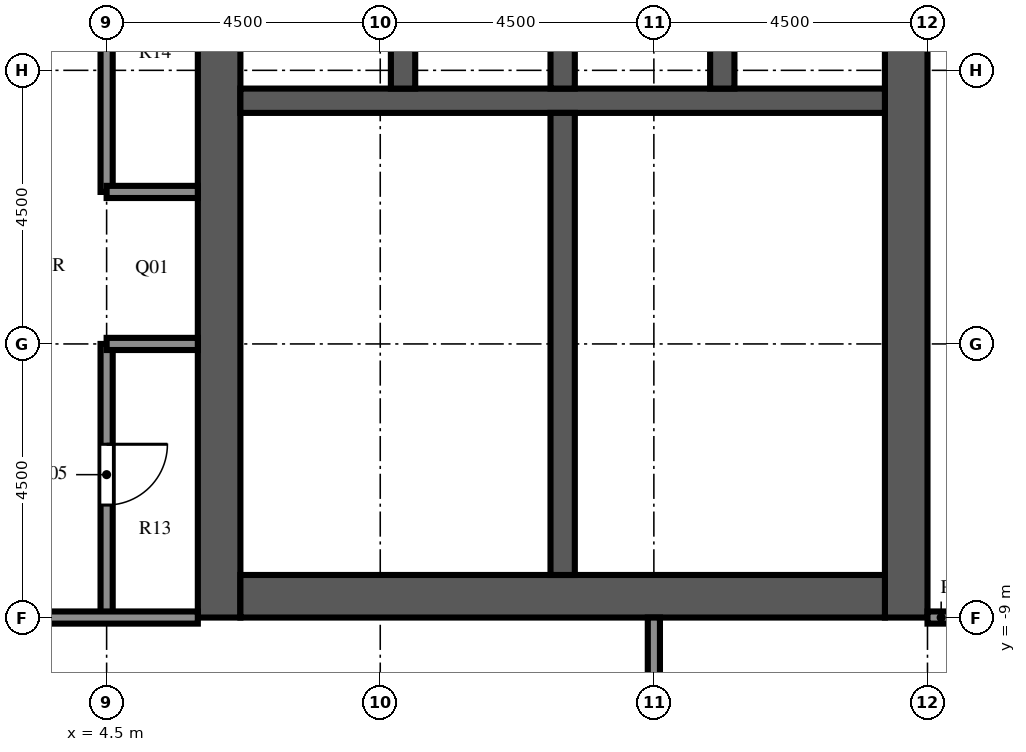
"""IFC4 building model, lengths in metres.
Left out: names, types, materials, properties, quantities, classifications, styles, units other than length and angle.
Written with IfcOpenShell. Run it as: python <this file> out.ifc"""

import sys

from ifc_helpers import new_model, si_unit, direction, frame, frame_2d, origin, place, context, subcontext, project, spatial, rectangle, extrude, element, fill, save


model = new_model("IFC4")
c1 = context("Model", 3, precision=1e-05, world=origin(), true_north=direction((0.0, 1.0)))
c2 = subcontext(c1, "Body", "Model", "MODEL_VIEW")
j1 = project(units=[si_unit("LENGTHUNIT", "METRE"), si_unit("PLANEANGLEUNIT", "RADIAN")], contexts=[c1])
p1 = place(None, origin())
s1 = spatial("IfcSite", under=j1, at=p1, CompositionType="ELEMENT")
p2 = place(p1, origin())
s2 = spatial("IfcBuilding", under=s1, at=p2, CompositionType="ELEMENT")
p3 = place(p2, frame((0.0, 0.0, 295.0)))
s3 = spatial("IfcBuildingStorey", under=s2, at=p3, CompositionType="ELEMENT", Elevation=295.0)
p4 = place(p3, frame((6.35, -9.0, 0.0), z_axis=(0.0, 0.0, 1.0), x_axis=(0.0, 1.0, 0.0)))
e1 = element("IfcWall", 1, at=p4, inside=s3, PredefinedType="SHEAR", context=c2, shape_type="SweptSolid", body=[
    extrude(rectangle(XDim=27.5, YDim=0.7, at=frame_2d((13.75, 0.0))), origin(), (0.0, 0.0, 1.0), 6.0),
])
p5 = place(p4, frame((12.55, 0.0, 0.0)))
e2 = element("IfcOpeningElement", 2, at=p5, cuts=e1, PredefinedType="OPENING", context=c2, shape_type="SweptSolid", body=[
    extrude(rectangle(XDim=2.4, YDim=2.4, at=frame_2d((1.2, 1.2))), frame((0.0, 0.36, 0.0), z_axis=(0.0, -1.0, 0.0), x_axis=(1.0, 0.0, 0.0)), (0.0, 0.0, 1.0), 0.72),
])
p6 = place(p4, frame((5.46, 0.0, 0.0)))
e3 = element("IfcOpeningElement", 3, at=p6, cuts=e1, PredefinedType="OPENING", context=c2, shape_type="SweptSolid", body=[
    extrude(rectangle(XDim=0.968, YDim=2.1, at=frame_2d((0.484, 1.05))), frame((0.0, 0.36, 0.0), z_axis=(0.0, -1.0, 0.0), x_axis=(1.0, 0.0, 0.0)), (0.0, 0.0, 1.0), 0.72),
])
p7 = place(p4, frame((23.54, 0.0, 0.0)))
e4 = element("IfcOpeningElement", 4, at=p7, cuts=e1, PredefinedType="OPENING", context=c2, shape_type="SweptSolid", body=[
    extrude(rectangle(XDim=1.2, YDim=2.1, at=frame_2d((0.6, 1.05))), frame((0.0, 0.36, 0.0), z_axis=(0.0, -1.0, 0.0), x_axis=(1.0, 0.0, 0.0)), (0.0, 0.0, 1.0), 0.72),
])
p8 = place(p3, frame((17.65, -9.0, 0.0), z_axis=(0.0, 0.0, 1.0), x_axis=(0.0, 1.0, 0.0)))
e5 = element("IfcWall", 5, at=p8, inside=s3, PredefinedType="SHEAR", context=c2, shape_type="SweptSolid", body=[
    extrude(rectangle(XDim=27.5, YDim=0.7, at=frame_2d((13.75, 0.0))), origin(), (0.0, 0.0, 1.0), 6.0),
])
p9 = place(p8, frame((12.55, 0.0, 0.0)))
e6 = element("IfcOpeningElement", 6, at=p9, cuts=e5, PredefinedType="OPENING", context=c2, shape_type="SweptSolid", body=[
    extrude(rectangle(XDim=2.4, YDim=2.4, at=frame_2d((1.2, 1.2))), frame((0.0, 0.36, 0.0), z_axis=(0.0, -1.0, 0.0), x_axis=(1.0, 0.0, 0.0)), (0.0, 0.0, 1.0), 0.72),
])
p10 = place(p8, frame((6.825, 0.0, 0.0)))
e7 = element("IfcOpeningElement", 7, at=p10, cuts=e5, PredefinedType="OPENING", context=c2, shape_type="SweptSolid", body=[
    extrude(rectangle(XDim=1.2, YDim=2.1, at=frame_2d((0.6, 1.05))), frame((0.0, 0.36, 0.0), z_axis=(0.0, -1.0, 0.0), x_axis=(1.0, 0.0, 0.0)), (0.0, 0.0, 1.0), 0.72),
])
p11 = place(p8, frame((19.475, 0.0, 0.0)))
e8 = element("IfcOpeningElement", 8, at=p11, cuts=e5, PredefinedType="OPENING", context=c2, shape_type="SweptSolid", body=[
    extrude(rectangle(XDim=1.2, YDim=2.1, at=frame_2d((0.6, 1.05))), frame((0.0, 0.36, 0.0), z_axis=(0.0, -1.0, 0.0), x_axis=(1.0, 0.0, 0.0)), (0.0, 0.0, 1.0), 0.72),
])
p12 = place(p3, frame((6.7, -8.65, 0.0), z_axis=(0.0, 0.0, 1.0), x_axis=(1.0, 0.0, 0.0)))
e9 = element("IfcWall", 9, at=p12, inside=s3, PredefinedType="SHEAR", context=c2, shape_type="SweptSolid", body=[
    extrude(rectangle(XDim=10.6, YDim=0.7, at=frame_2d((5.3, 0.0))), origin(), (0.0, 0.0, 1.0), 6.0),
])
p13 = place(p3, frame((6.7, -0.5, 0.0), z_axis=(0.0, 0.0, 1.0), x_axis=(1.0, 0.0, 0.0)))
e10 = element("IfcWall", 10, at=p13, inside=s3, PredefinedType="SHEAR", context=c2, shape_type="SweptSolid", body=[
    extrude(rectangle(XDim=10.6, YDim=0.4, at=frame_2d((5.3, 0.0))), origin(), (0.0, 0.0, 1.0), 6.0),
])
for number, where, z_axis, x_axis in (
    (11, (9.375, -0.3, 0.0), (0.0, 0.0, 1.0), (0.0, 1.0, 0.0)),
    (12, (12.0, -0.3, 0.0), (0.0, 0.0, 1.0), (0.0, 1.0, 0.0)),
    (13, (14.625, -0.3, 0.0), (0.0, 0.0, 1.0), (0.0, 1.0, 0.0)),
):
    element("IfcWall", number, at=place(p3, frame(where, z_axis=z_axis, x_axis=x_axis)), inside=s3, PredefinedType="SHEAR", context=c2, shape_type="SweptSolid", body=[
        extrude(rectangle(XDim=2.9, YDim=0.4, at=frame_2d((1.45, 0.0))), origin(), (0.0, 0.0, 1.0), 6.0),
    ])
p14 = place(p3, frame((12.0, -8.3, 0.0), z_axis=(0.0, 0.0, 1.0), x_axis=(0.0, 1.0, 0.0)))
e14 = element("IfcWall", 14, at=p14, inside=s3, PredefinedType="SHEAR", context=c2, shape_type="SweptSolid", body=[
    extrude(rectangle(XDim=7.6, YDim=0.4, at=frame_2d((3.8, 0.0))), origin(), (0.0, 0.0, 1.0), 6.0),
])
p15 = place(p3, frame((6.7, -3.74, 0.0), z_axis=(0.0, 0.0, 1.0), x_axis=(1.0, 0.0, 0.0)))
e15 = element("IfcWall", 15, at=p15, inside=s3, PredefinedType="PARTITIONING", context=c2, shape_type="SweptSolid", body=[
    extrude(rectangle(XDim=2.55, YDim=0.1, at=frame_2d((1.275, 0.0))), origin(), (0.0, 0.0, 1.0), 5.4),
])
p16 = place(p15, frame((0.775, 0.0, 0.0)))
e16 = element("IfcOpeningElement", 16, at=p16, cuts=e15, PredefinedType="OPENING", context=c2, shape_type="SweptSolid", body=[
    extrude(rectangle(XDim=1.0, YDim=2.1, at=frame_2d((0.5, 1.05))), frame((0.0, 0.06, 0.0), z_axis=(0.0, -1.0, 0.0), x_axis=(1.0, 0.0, 0.0)), (0.0, 0.0, 1.0), 0.12),
])
p17 = place(p3, frame((9.25, -3.74, 0.0), z_axis=(0.0, 0.0, 1.0), x_axis=(1.0, 0.0, 0.0)))
e17 = element("IfcWall", 17, at=p17, inside=s3, PredefinedType="PARTITIONING", context=c2, shape_type="SweptSolid", body=[
    extrude(rectangle(XDim=2.55, YDim=0.1, at=frame_2d((1.275, 0.0))), origin(), (0.0, 0.0, 1.0), 5.4),
])
p18 = place(p17, frame((0.775, 0.0, 0.0)))
e18 = element("IfcOpeningElement", 18, at=p18, cuts=e17, PredefinedType="OPENING", context=c2, shape_type="SweptSolid", body=[
    extrude(rectangle(XDim=1.0, YDim=2.1, at=frame_2d((0.5, 1.05))), frame((0.0, 0.06, 0.0), z_axis=(0.0, -1.0, 0.0), x_axis=(1.0, 0.0, 0.0)), (0.0, 0.0, 1.0), 0.12),
])
p19 = place(p3, frame((6.7, -2.372, 0.0), z_axis=(0.0, 0.0, 1.0), x_axis=(1.0, 0.0, 0.0)))
e19 = element("IfcWall", 19, at=p19, inside=s3, PredefinedType="PARTITIONING", context=c2, shape_type="SweptSolid", body=[
    extrude(rectangle(XDim=2.55, YDim=0.1, at=frame_2d((1.275, 0.0))), origin(), (0.0, 0.0, 1.0), 5.4),
])
p20 = place(p19, frame((0.775, 0.0, 0.0)))
e20 = element("IfcOpeningElement", 20, at=p20, cuts=e19, PredefinedType="OPENING", context=c2, shape_type="SweptSolid", body=[
    extrude(rectangle(XDim=1.0, YDim=2.1, at=frame_2d((0.5, 1.05))), frame((0.0, 0.06, 0.0), z_axis=(0.0, -1.0, 0.0), x_axis=(1.0, 0.0, 0.0)), (0.0, 0.0, 1.0), 0.12),
])
p21 = place(p3, frame((9.25, -2.372, 0.0), z_axis=(0.0, 0.0, 1.0), x_axis=(1.0, 0.0, 0.0)))
e21 = element("IfcWall", 21, at=p21, inside=s3, PredefinedType="PARTITIONING", context=c2, shape_type="SweptSolid", body=[
    extrude(rectangle(XDim=2.55, YDim=0.1, at=frame_2d((1.275, 0.0))), origin(), (0.0, 0.0, 1.0), 5.4),
])
p22 = place(p21, frame((0.775, 0.0, 0.0)))
e22 = element("IfcOpeningElement", 22, at=p22, cuts=e21, PredefinedType="OPENING", context=c2, shape_type="SweptSolid", body=[
    extrude(rectangle(XDim=1.0, YDim=2.1, at=frame_2d((0.5, 1.05))), frame((0.0, 0.06, 0.0), z_axis=(0.0, -1.0, 0.0), x_axis=(1.0, 0.0, 0.0)), (0.0, 0.0, 1.0), 0.12),
])
p23 = place(p3, frame((9.25, -8.3, 0.0), z_axis=(0.0, 0.0, 1.0), x_axis=(0.0, 1.0, 0.0)))
e23 = element("IfcWall", 23, at=p23, inside=s3, PredefinedType="PARTITIONING", context=c2, shape_type="SweptSolid", body=[
    extrude(rectangle(XDim=4.56, YDim=0.1, at=frame_2d((2.28, 0.0))), origin(), (0.0, 0.0, 1.0), 5.4),
])
p24 = place(p3, frame((9.25, -2.372, 0.0), z_axis=(0.0, 0.0, 1.0), x_axis=(0.0, 1.0, 0.0)))
e24 = element("IfcWall", 24, at=p24, inside=s3, PredefinedType="PARTITIONING", context=c2, shape_type="SweptSolid", body=[
    extrude(rectangle(XDim=1.672, YDim=0.1, at=frame_2d((0.836, 0.0))), origin(), (0.0, 0.0, 1.0), 5.4),
])
p25 = place(p3, frame((4.5, -4.5, 0.0), z_axis=(0.0, 0.0, 1.0), x_axis=(0.0, -1.0, 0.0)))
e25 = element("IfcWall", 25, at=p25, inside=s3, PredefinedType="PARTITIONING", context=c2, shape_type="SweptSolid", body=[
    extrude(rectangle(XDim=4.5, YDim=0.2, at=frame_2d((2.25, 0.0))), origin(), (0.0, 0.0, 1.0), 5.4),
])
p26 = place(p25, frame((1.65, 0.0, 0.0)))
e26 = element("IfcOpeningElement", 26, at=p26, cuts=e25, PredefinedType="OPENING", context=c2, shape_type="SweptSolid", body=[
    extrude(rectangle(XDim=1.0, YDim=2.1, at=frame_2d((0.5, 1.05))), frame((0.0, 0.11, 0.0), z_axis=(0.0, -1.0, 0.0), x_axis=(1.0, 0.0, 0.0)), (0.0, 0.0, 1.0), 0.22),
])
p27 = place(p3, frame((4.5, 2.8, 0.0), z_axis=(0.0, 0.0, 1.0), x_axis=(0.0, -1.0, 0.0)))
e27 = element("IfcWall", 27, at=p27, inside=s3, PredefinedType="PARTITIONING", context=c2, shape_type="SweptSolid", body=[
    extrude(rectangle(XDim=4.8, YDim=0.2, at=frame_2d((2.4, 0.0))), origin(), (0.0, 0.0, 1.0), 5.4),
])
p28 = place(p27, frame((1.2, 0.0, 0.0)))
e28 = element("IfcOpeningElement", 28, at=p28, cuts=e27, PredefinedType="OPENING", context=c2, shape_type="SweptSolid", body=[
    extrude(rectangle(XDim=1.0, YDim=2.1, at=frame_2d((0.5, 1.05))), frame((0.0, 0.11, 0.0), z_axis=(0.0, -1.0, 0.0), x_axis=(1.0, 0.0, 0.0)), (0.0, 0.0, 1.0), 0.22),
])
p29 = place(p3, frame((13.5, -13.05, 0.0), z_axis=(0.0, 0.0, 1.0), x_axis=(0.0, 1.0, 0.0)))
e29 = element("IfcWall", 29, at=p29, inside=s3, PredefinedType="PARTITIONING", context=c2, shape_type="SweptSolid", body=[
    extrude(rectangle(XDim=4.05, YDim=0.2, at=frame_2d((2.025, 0.0))), origin(), (0.0, 0.0, 1.0), 5.4),
])
p30 = place(p3, frame((1.5, -9.0, 0.0), z_axis=(0.0, 0.0, 1.0), x_axis=(1.0, 0.0, 0.0)))
e30 = element("IfcWall", 30, at=p30, inside=s3, PredefinedType="PARTITIONING", context=c2, shape_type="SweptSolid", body=[
    extrude(rectangle(XDim=4.5, YDim=0.2, at=frame_2d((2.25, 0.0))), origin(), (0.0, 0.0, 1.0), 5.4),
])
p31 = place(p3, frame((18.0, -9.0, 0.0), z_axis=(0.0, 0.0, 1.0), x_axis=(1.0, 0.0, 0.0)))
e31 = element("IfcWall", 31, at=p31, inside=s3, PredefinedType="PARTITIONING", context=c2, shape_type="SweptSolid", body=[
    extrude(rectangle(XDim=0.45, YDim=0.2, at=frame_2d((0.225, 0.0))), origin(), (0.0, 0.0, 1.0), 3.57),
])
for number, where, z_axis, x_axis in (
    (32, (4.5, -4.5, 0.0), (0.0, 0.0, 1.0), (1.0, 0.0, 0.0)),
    (33, (4.5, -2.0, 0.0), (0.0, 0.0, 1.0), (1.0, 0.0, 0.0)),
):
    element("IfcWall", number, at=place(p3, frame(where, z_axis=z_axis, x_axis=x_axis)), inside=s3, PredefinedType="PARTITIONING", context=c2, shape_type="SweptSolid", body=[
        extrude(rectangle(XDim=1.5, YDim=0.2, at=frame_2d((0.75, 0.0))), origin(), (0.0, 0.0, 1.0), 5.4),
    ])
p32 = place(p10, frame((1.2, 0.0, 0.0), z_axis=(0.0, 0.0, 1.0), x_axis=(-1.0, 0.0, 0.0)))
e34 = element("IfcDoor", 34, at=p32, inside=s3, OperationType="SINGLE_SWING_LEFT", PredefinedType="DOOR", context=c2, shape_type="SweptSolid", body=[
    extrude(rectangle(XDim=1.2, YDim=2.1, at=frame_2d((0.6, 1.05))), frame((0.0, 0.025, 0.0), z_axis=(0.0, -1.0, 0.0), x_axis=(1.0, 0.0, 0.0)), (0.0, 0.0, 1.0), 0.05),
])
fill(e7, e34)
p33 = place(p6, origin())
e35 = element("IfcDoor", 35, at=p33, inside=s3, OperationType="SINGLE_SWING_RIGHT", PredefinedType="DOOR", context=c2, shape_type="SweptSolid", body=[
    extrude(rectangle(XDim=0.968, YDim=2.1, at=frame_2d((0.484, 1.05))), frame((0.0, -0.275, 0.0), z_axis=(0.0, -1.0, 0.0), x_axis=(1.0, 0.0, 0.0)), (0.0, 0.0, 1.0), 0.05),
])
fill(e3, e35)
p34 = place(p16, origin())
e36 = element("IfcDoor", 36, at=p34, inside=s3, OperationType="SINGLE_SWING_LEFT", PredefinedType="DOOR", context=c2, shape_type="SweptSolid", body=[
    extrude(rectangle(XDim=1.0, YDim=2.1, at=frame_2d((0.5, 1.05))), frame((0.0, 0.025, 0.0), z_axis=(0.0, -1.0, 0.0), x_axis=(1.0, 0.0, 0.0)), (0.0, 0.0, 1.0), 0.05),
])
fill(e16, e36)
p35 = place(p18, origin())
e37 = element("IfcDoor", 37, at=p35, inside=s3, OperationType="SINGLE_SWING_RIGHT", PredefinedType="DOOR", context=c2, shape_type="SweptSolid", body=[
    extrude(rectangle(XDim=1.0, YDim=2.1, at=frame_2d((0.5, 1.05))), frame((0.0, 0.025, 0.0), z_axis=(0.0, -1.0, 0.0), x_axis=(1.0, 0.0, 0.0)), (0.0, 0.0, 1.0), 0.05),
])
fill(e18, e37)
p36 = place(p20, origin())
e38 = element("IfcDoor", 38, at=p36, inside=s3, OperationType="SINGLE_SWING_LEFT", PredefinedType="DOOR", context=c2, shape_type="SweptSolid", body=[
    extrude(rectangle(XDim=1.0, YDim=2.1, at=frame_2d((0.5, 1.05))), frame((0.0, 0.025, 0.0), z_axis=(0.0, -1.0, 0.0), x_axis=(1.0, 0.0, 0.0)), (0.0, 0.0, 1.0), 0.05),
])
fill(e20, e38)
p37 = place(p22, origin())
e39 = element("IfcDoor", 39, at=p37, inside=s3, OperationType="SINGLE_SWING_RIGHT", PredefinedType="DOOR", context=c2, shape_type="SweptSolid", body=[
    extrude(rectangle(XDim=1.0, YDim=2.1, at=frame_2d((0.5, 1.05))), frame((0.0, 0.025, 0.0), z_axis=(0.0, -1.0, 0.0), x_axis=(1.0, 0.0, 0.0)), (0.0, 0.0, 1.0), 0.05),
])
fill(e22, e39)
p38 = place(p26, origin())
e40 = element("IfcDoor", 40, at=p38, inside=s3, OperationType="SINGLE_SWING_LEFT", PredefinedType="DOOR", context=c2, shape_type="SweptSolid", body=[
    extrude(rectangle(XDim=1.0, YDim=2.1, at=frame_2d((0.5, 1.05))), frame((0.0, 0.025, 0.0), z_axis=(0.0, -1.0, 0.0), x_axis=(1.0, 0.0, 0.0)), (0.0, 0.0, 1.0), 0.05),
])
fill(e26, e40)
save(model, sys.argv[1])
